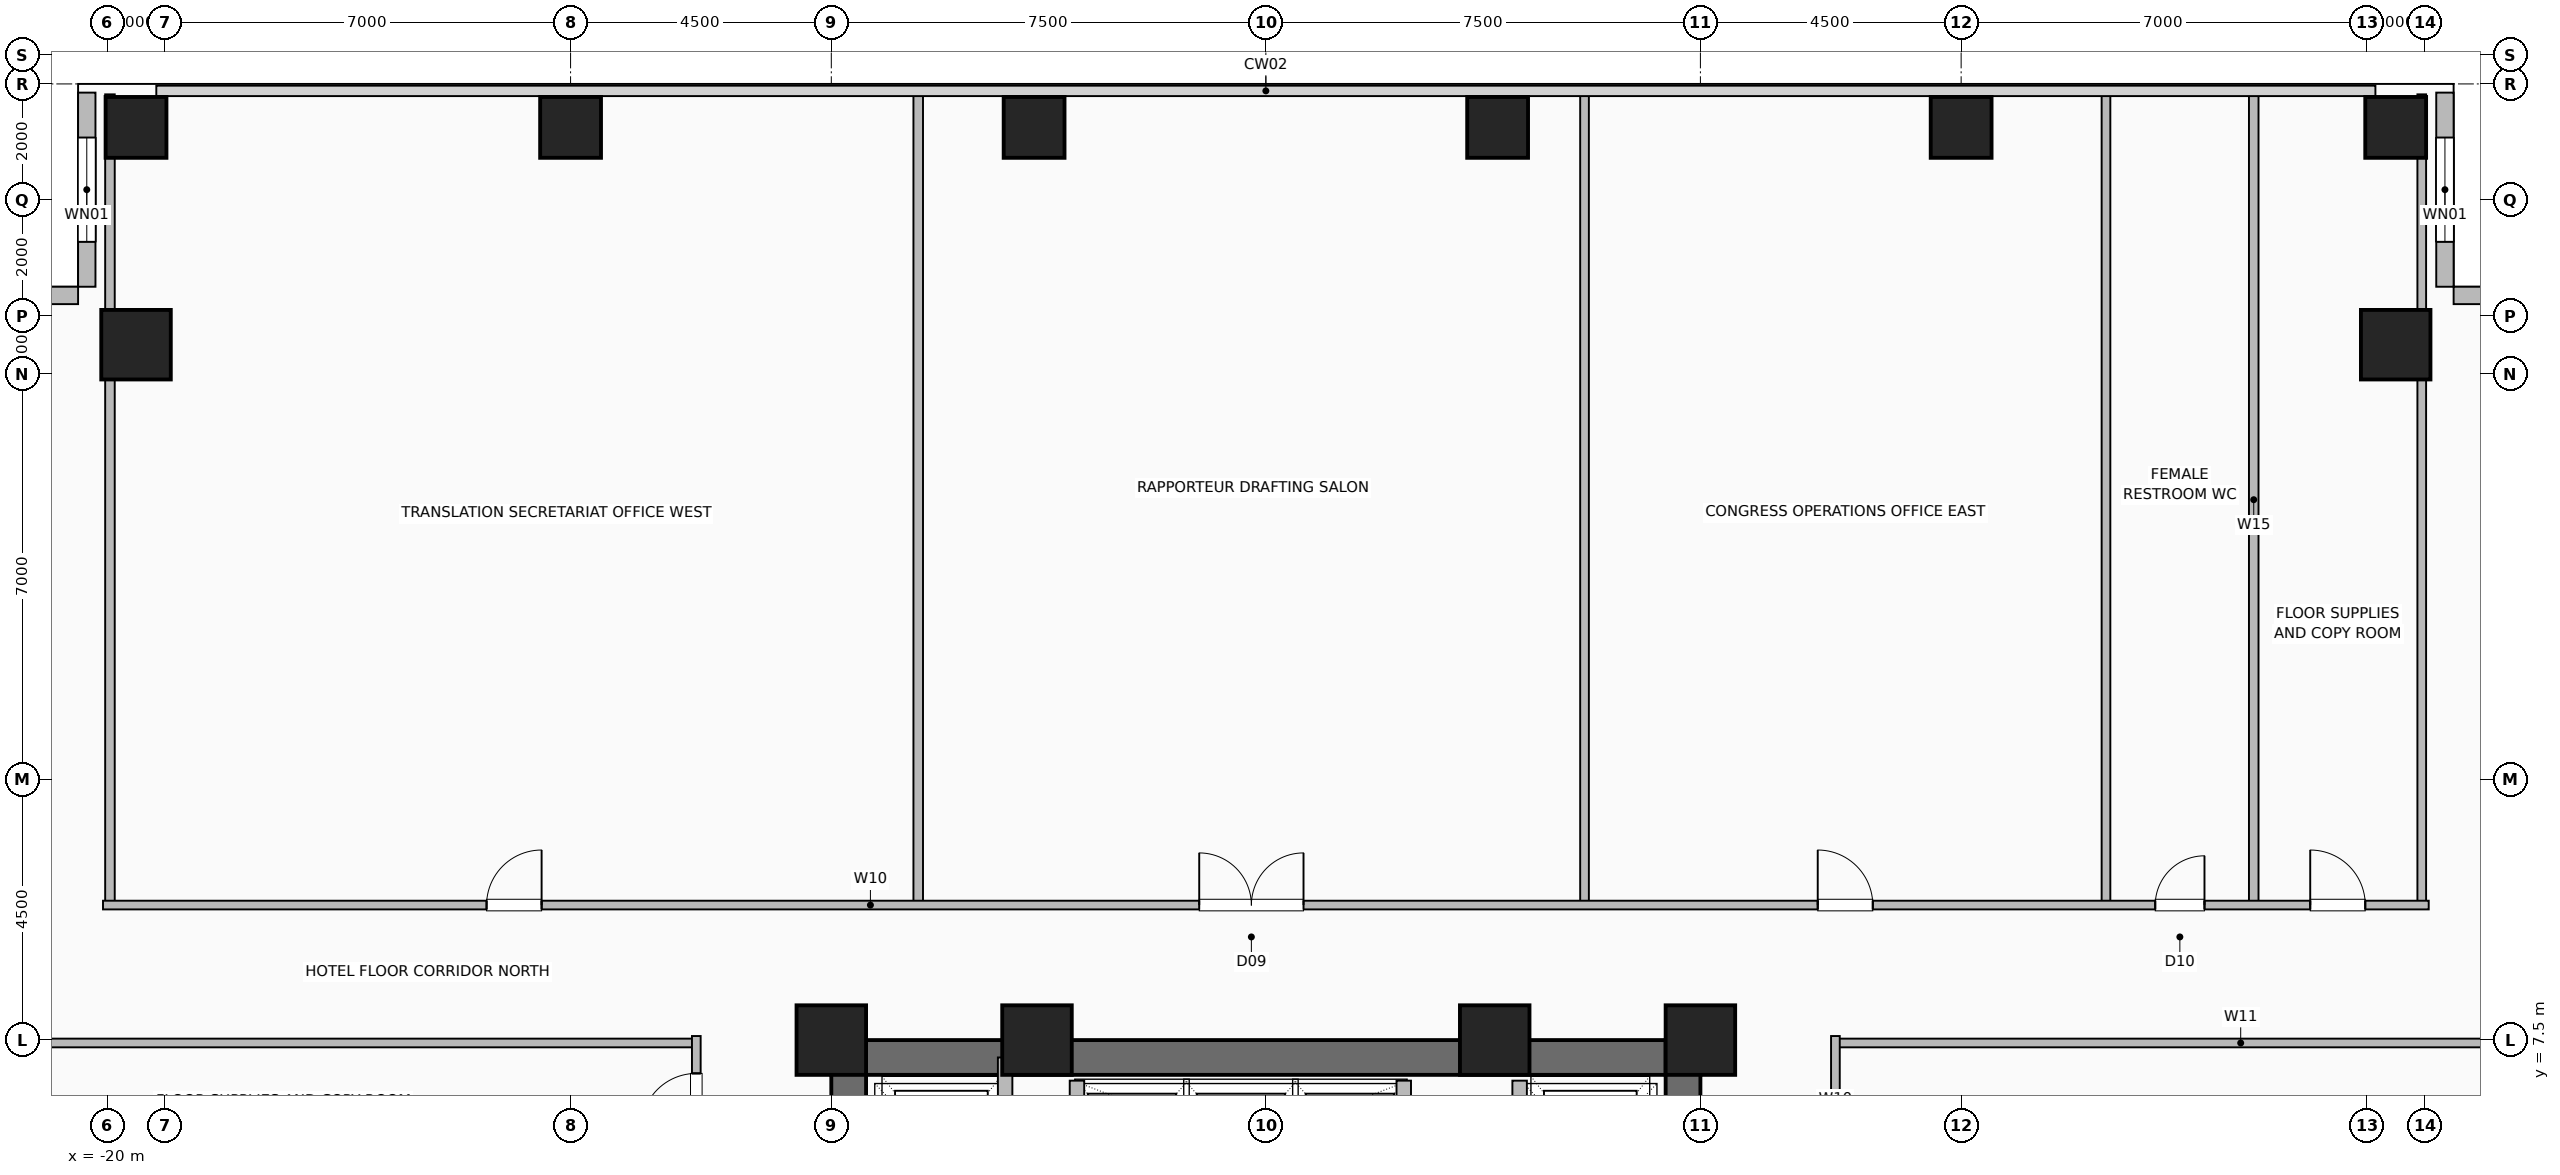
"""IFC4 building model, lengths in metres.
Left out: names, types, materials, properties, quantities, classifications, styles, units other than length and angle.
Written with IfcOpenShell. Run it as: python <this file> out.ifc"""

import sys

from ifc_helpers import new_model, si_unit, direction, frame, frame_2d, origin, origin_2d, place, context, subcontext, project, spatial, rectangle, hollow_rectangle, extrude, element, fill, save


model = new_model("IFC4")
c1 = context("Model", 3, precision=1e-05, world=origin(), true_north=direction((0.0, 1.0)))
c2 = subcontext(c1, "Body", "Model", "MODEL_VIEW")
j1 = project(units=[si_unit("LENGTHUNIT", "METRE"), si_unit("PLANEANGLEUNIT", "RADIAN")], contexts=[c1])
p1 = place(None, origin())
s1 = spatial("IfcSite", under=j1, at=p1, CompositionType="ELEMENT")
p2 = place(p1, origin())
s2 = spatial("IfcBuilding", under=s1, at=p2, CompositionType="ELEMENT")
p3 = place(p2, frame((0.0, 0.0, 41.0)))
s3 = spatial("IfcBuildingStorey", under=s2, at=p3, CompositionType="ELEMENT", Elevation=41.0)
for number, where, z_axis, x_axis in (
    (1, (7.5, 7.5, 0.0), (0.0, 0.0, 1.0), (1.0, 0.0, 0.0)),
    (2, (3.95, 7.5, 0.0), (0.0, 0.0, 1.0), (1.0, 0.0, 0.0)),
    (3, (-3.95, 7.5, 0.0), (0.0, 0.0, 1.0), (1.0, 0.0, 0.0)),
    (4, (-7.5, 7.5, 0.0), (0.0, 0.0, 1.0), (1.0, 0.0, 0.0)),
):
    element("IfcColumn", number, at=place(p3, frame(where, z_axis=z_axis, x_axis=x_axis)), inside=s3, PredefinedType="COLUMN", context=c2, shape_type="SweptSolid", body=[
        extrude(hollow_rectangle(XDim=1.2, YDim=1.2, WallThickness=0.055, at=origin_2d()), origin(), (0.0, 0.0, 1.0), 3.5),
    ])
for number, where, z_axis, x_axis in (
    (5, (-19.5, 23.25, 0.0), (0.0, 0.0, 1.0), (1.0, 0.0, 0.0)),
    (6, (-12.0, 23.25, 0.0), (0.0, 0.0, 1.0), (1.0, 0.0, 0.0)),
    (7, (-4.0, 23.25, 0.0), (0.0, 0.0, 1.0), (1.0, 0.0, 0.0)),
    (8, (4.0, 23.25, 0.0), (0.0, 0.0, 1.0), (1.0, 0.0, 0.0)),
    (9, (12.0, 23.25, 0.0), (0.0, 0.0, 1.0), (1.0, 0.0, 0.0)),
    (10, (19.5, 23.25, 0.0), (0.0, 0.0, 1.0), (1.0, 0.0, 0.0)),
):
    element("IfcColumn", number, at=place(p3, frame(where, z_axis=z_axis, x_axis=x_axis)), inside=s3, PredefinedType="COLUMN", context=c2, shape_type="SweptSolid", body=[
        extrude(hollow_rectangle(XDim=1.05, YDim=1.05, WallThickness=0.05, at=origin_2d()), origin(), (0.0, 0.0, 1.0), 3.5),
    ])
for number, where, z_axis, x_axis in (
    (11, (19.5, 19.5, 0.0), (0.0, 0.0, 1.0), (1.0, 0.0, 0.0)),
    (12, (-19.5, 19.5, 0.0), (0.0, 0.0, 1.0), (1.0, 0.0, 0.0)),
):
    element("IfcColumn", number, at=place(p3, frame(where, z_axis=z_axis, x_axis=x_axis)), inside=s3, PredefinedType="COLUMN", context=c2, shape_type="SweptSolid", body=[
        extrude(hollow_rectangle(XDim=1.2, YDim=1.2, WallThickness=0.055, at=origin_2d()), origin(), (0.0, 0.0, 1.0), 3.5),
    ])
p4 = place(p3, frame((20.35, 23.85, 0.0), z_axis=(0.0, 0.0, 1.0), x_axis=(0.0, -1.0, 0.0)))
e13 = element("IfcWall", 13, at=p4, inside=s3, PredefinedType="SOLIDWALL", context=c2, shape_type="SweptSolid", body=[
    extrude(rectangle(XDim=3.35, YDim=0.3, at=frame_2d((1.675, 0.0))), origin(), (0.0, 0.0, 1.0), 3.25),
])
p5 = place(p4, frame((0.775, 0.0, 0.9)))
e14 = element("IfcOpeningElement", 14, at=p5, cuts=e13, PredefinedType="OPENING", context=c2, shape_type="SweptSolid", body=[
    extrude(rectangle(XDim=1.8, YDim=1.8, at=frame_2d((0.9, 0.9))), frame((0.0, 0.16, 0.0), z_axis=(0.0, -1.0, 0.0), x_axis=(1.0, 0.0, 0.0)), (0.0, 0.0, 1.0), 0.32),
])
p6 = place(p3, frame((23.85, 20.35, 0.0), z_axis=(0.0, 0.0, 1.0), x_axis=(-1.0, 0.0, 0.0)))
e15 = element("IfcWall", 15, at=p6, inside=s3, PredefinedType="SOLIDWALL", context=c2, shape_type="SweptSolid", body=[
    extrude(rectangle(XDim=3.35, YDim=0.3, at=frame_2d((1.675, 0.0))), origin(), (0.0, 0.0, 1.0), 3.25),
])
p7 = place(p3, frame((-20.35, 23.85, 0.0), z_axis=(0.0, 0.0, 1.0), x_axis=(0.0, -1.0, 0.0)))
e16 = element("IfcWall", 16, at=p7, inside=s3, PredefinedType="SOLIDWALL", context=c2, shape_type="SweptSolid", body=[
    extrude(rectangle(XDim=3.35, YDim=0.3, at=frame_2d((1.675, 0.0))), origin(), (0.0, 0.0, 1.0), 3.25),
])
p8 = place(p7, frame((0.775, 0.0, 0.9)))
e17 = element("IfcOpeningElement", 17, at=p8, cuts=e16, PredefinedType="OPENING", context=c2, shape_type="SweptSolid", body=[
    extrude(rectangle(XDim=1.8, YDim=1.8, at=frame_2d((0.9, 0.9))), frame((0.0, 0.16, 0.0), z_axis=(0.0, -1.0, 0.0), x_axis=(1.0, 0.0, 0.0)), (0.0, 0.0, 1.0), 0.32),
])
p9 = place(p3, frame((-23.85, 20.35, 0.0), z_axis=(0.0, 0.0, 1.0), x_axis=(1.0, 0.0, 0.0)))
e18 = element("IfcWall", 18, at=p9, inside=s3, PredefinedType="SOLIDWALL", context=c2, shape_type="SweptSolid", body=[
    extrude(rectangle(XDim=3.35, YDim=0.3, at=frame_2d((1.675, 0.0))), origin(), (0.0, 0.0, 1.0), 3.25),
])
p10 = place(p3, frame((-7.5, 7.2, 0.0), z_axis=(0.0, 0.0, 1.0), x_axis=(1.0, 0.0, 0.0)))
e19 = element("IfcWall", 19, at=p10, inside=s3, PredefinedType="SHEAR", context=c2, shape_type="SweptSolid", body=[
    extrude(rectangle(XDim=15.0, YDim=0.6, at=frame_2d((7.5, 0.0))), origin(), (0.0, 0.0, 1.0), 3.25),
])
p11 = place(p3, frame((-7.2, -7.5, 0.0), z_axis=(0.0, 0.0, 1.0), x_axis=(0.0, 1.0, 0.0)))
e20 = element("IfcWall", 20, at=p11, inside=s3, PredefinedType="SHEAR", context=c2, shape_type="SweptSolid", body=[
    extrude(rectangle(XDim=15.0, YDim=0.6, at=frame_2d((7.5, 0.0))), origin(), (0.0, 0.0, 1.0), 3.25),
])
p12 = place(p11, frame((9.5, 0.0, 0.0)))
e21 = element("IfcOpeningElement", 21, at=p12, cuts=e20, PredefinedType="OPENING", context=c2, shape_type="SweptSolid", body=[
    extrude(rectangle(XDim=1.0, YDim=2.08, at=frame_2d((0.5, 1.04))), frame((0.0, 0.31, 0.0), z_axis=(0.0, -1.0, 0.0), x_axis=(1.0, 0.0, 0.0)), (0.0, 0.0, 1.0), 0.62),
])
p13 = place(p3, frame((7.2, -7.5, 0.0), z_axis=(0.0, 0.0, 1.0), x_axis=(0.0, 1.0, 0.0)))
e22 = element("IfcWall", 22, at=p13, inside=s3, PredefinedType="SHEAR", context=c2, shape_type="SweptSolid", body=[
    extrude(rectangle(XDim=15.0, YDim=0.6, at=frame_2d((7.5, 0.0))), origin(), (0.0, 0.0, 1.0), 3.25),
])
for number, where, z_axis, x_axis in (
    (23, (-3.26, 4.58, 0.0), (0.0, 0.0, 1.0), (0.0, 1.0, 0.0)),
    (24, (2.38, 4.58, 0.0), (0.0, 0.0, 1.0), (0.0, 1.0, 0.0)),
):
    element("IfcWall", number, at=place(p3, frame(where, z_axis=z_axis, x_axis=x_axis)), inside=s3, PredefinedType="SHEAR", context=c2, shape_type="SweptSolid", body=[
        extrude(rectangle(XDim=2.22, YDim=0.25, at=frame_2d((1.11, 0.0))), origin(), (0.0, 0.0, 1.0), 3.25),
    ])
p14 = place(p3, frame((-4.5, 4.35, 0.0), z_axis=(0.0, 0.0, 1.0), x_axis=(0.0, 1.0, 0.0)))
e25 = element("IfcWall", 25, at=p14, inside=s3, PredefinedType="SHEAR", context=c2, shape_type="SweptSolid", body=[
    extrude(rectangle(XDim=2.85, YDim=0.25, at=frame_2d((1.425, 0.0))), origin(), (0.0, 0.0, 1.0), 3.25),
])
p15 = place(p3, frame((4.38, 4.3, 0.0), z_axis=(0.0, 0.0, 1.0), x_axis=(0.0, 1.0, 0.0)))
e26 = element("IfcWall", 26, at=p15, inside=s3, PredefinedType="SHEAR", context=c2, shape_type="SweptSolid", body=[
    extrude(rectangle(XDim=2.5, YDim=0.25, at=frame_2d((1.25, 0.0))), origin(), (0.0, 0.0, 1.0), 3.25),
])
p16 = place(p15, frame((0.8, 0.0, 0.0)))
e27 = element("IfcOpeningElement", 27, at=p16, cuts=e26, PredefinedType="OPENING", context=c2, shape_type="SweptSolid", body=[
    extrude(rectangle(XDim=1.2, YDim=2.2, at=frame_2d((0.6, 1.1))), frame((0.0, 0.135, 0.0), z_axis=(0.0, -1.0, 0.0), x_axis=(1.0, 0.0, 0.0)), (0.0, 0.0, 1.0), 0.27),
])
for number, where, z_axis, x_axis in (
    (28, (17.05, 9.83, 0.0), (0.0, 0.0, 1.0), (0.0, 1.0, 0.0)),
    (29, (-19.95, 9.83, 0.0), (0.0, 0.0, 1.0), (0.0, 1.0, 0.0)),
    (30, (-6.0, 9.83, 0.0), (0.0, 0.0, 1.0), (0.0, 1.0, 0.0)),
):
    element("IfcWall", number, at=place(p3, frame(where, z_axis=z_axis, x_axis=x_axis)), inside=s3, PredefinedType="PLUMBINGWALL", context=c2, shape_type="SweptSolid", body=[
        extrude(rectangle(XDim=13.99, YDim=0.165, at=frame_2d((6.995, 0.0))), origin(), (0.0, 0.0, 1.0), 3.25),
    ])
for number, where, z_axis, x_axis in (
    (31, (5.5, 9.83, 0.0), (0.0, 0.0, 1.0), (0.0, 1.0, 0.0)),
    (32, (14.5, 9.83, 0.0), (0.0, 0.0, 1.0), (0.0, 1.0, 0.0)),
    (33, (19.95, 9.83, 0.0), (0.0, 0.0, 1.0), (0.0, 1.0, 0.0)),
):
    element("IfcWall", number, at=place(p3, frame(where, z_axis=z_axis, x_axis=x_axis)), inside=s3, PredefinedType="PARTITIONING", context=c2, shape_type="SweptSolid", body=[
        extrude(rectangle(XDim=13.99, YDim=0.15, at=frame_2d((6.995, 0.0))), origin(), (0.0, 0.0, 1.0), 3.25),
    ])
p17 = place(p3, frame((-20.07, 9.83, 0.0), z_axis=(0.0, 0.0, 1.0), x_axis=(1.0, 0.0, 0.0)))
e34 = element("IfcWall", 34, at=p17, inside=s3, PredefinedType="PARTITIONING", context=c2, shape_type="SweptSolid", body=[
    extrude(rectangle(XDim=40.14, YDim=0.15, at=frame_2d((20.07, 0.0))), origin(), (0.0, 0.0, 1.0), 3.25),
])
p18 = place(p17, frame((6.62, 0.0, 0.0)))
e35 = element("IfcOpeningElement", 35, at=p18, cuts=e34, PredefinedType="OPENING", context=c2, shape_type="SweptSolid", body=[
    extrude(rectangle(XDim=0.95, YDim=2.06, at=frame_2d((0.475, 1.03))), frame((0.0, 0.085, 0.0), z_axis=(0.0, -1.0, 0.0), x_axis=(1.0, 0.0, 0.0)), (0.0, 0.0, 1.0), 0.17),
])
p19 = place(p17, frame((18.92, 0.0, 0.0)))
e36 = element("IfcOpeningElement", 36, at=p19, cuts=e34, PredefinedType="OPENING", context=c2, shape_type="SweptSolid", body=[
    extrude(rectangle(XDim=1.8, YDim=2.08, at=frame_2d((0.9, 1.04))), frame((0.0, 0.085, 0.0), z_axis=(0.0, -1.0, 0.0), x_axis=(1.0, 0.0, 0.0)), (0.0, 0.0, 1.0), 0.17),
])
p20 = place(p17, frame((29.595, 0.0, 0.0)))
e37 = element("IfcOpeningElement", 37, at=p20, cuts=e34, PredefinedType="OPENING", context=c2, shape_type="SweptSolid", body=[
    extrude(rectangle(XDim=0.95, YDim=2.06, at=frame_2d((0.475, 1.03))), frame((0.0, 0.085, 0.0), z_axis=(0.0, -1.0, 0.0), x_axis=(1.0, 0.0, 0.0)), (0.0, 0.0, 1.0), 0.17),
])
p21 = place(p17, frame((35.42, 0.0, 0.0)))
e38 = element("IfcOpeningElement", 38, at=p21, cuts=e34, PredefinedType="OPENING", context=c2, shape_type="SweptSolid", body=[
    extrude(rectangle(XDim=0.85, YDim=2.05, at=frame_2d((0.425, 1.025))), frame((0.0, 0.085, 0.0), z_axis=(0.0, -1.0, 0.0), x_axis=(1.0, 0.0, 0.0)), (0.0, 0.0, 1.0), 0.17),
])
p22 = place(p17, frame((38.095, 0.0, 0.0)))
e39 = element("IfcOpeningElement", 39, at=p22, cuts=e34, PredefinedType="OPENING", context=c2, shape_type="SweptSolid", body=[
    extrude(rectangle(XDim=0.95, YDim=2.06, at=frame_2d((0.475, 1.03))), frame((0.0, 0.085, 0.0), z_axis=(0.0, -1.0, 0.0), x_axis=(1.0, 0.0, 0.0)), (0.0, 0.0, 1.0), 0.17),
])
p23 = place(p3, frame((-23.82, 7.45, 0.0), z_axis=(0.0, 0.0, 1.0), x_axis=(1.0, 0.0, 0.0)))
e40 = element("IfcWall", 40, at=p23, inside=s3, PredefinedType="PARTITIONING", context=c2, shape_type="SweptSolid", body=[
    extrude(rectangle(XDim=13.99, YDim=0.15, at=frame_2d((6.995, 0.0))), origin(), (0.0, 0.0, 1.0), 3.25),
])
p24 = place(p3, frame((-9.83, -7.57, 0.0), z_axis=(0.0, 0.0, 1.0), x_axis=(0.0, 1.0, 0.0)))
e41 = element("IfcWall", 41, at=p24, inside=s3, PredefinedType="PARTITIONING", context=c2, shape_type="SweptSolid", body=[
    extrude(rectangle(XDim=15.14, YDim=0.15, at=frame_2d((7.57, 0.0))), origin(), (0.0, 0.0, 1.0), 3.25),
])
p25 = place(p24, frame((4.845, 0.0, 0.0)))
e42 = element("IfcOpeningElement", 42, at=p25, cuts=e41, PredefinedType="OPENING", context=c2, shape_type="SweptSolid", body=[
    extrude(rectangle(XDim=1.8, YDim=2.08, at=frame_2d((0.9, 1.04))), frame((0.0, 0.085, 0.0), z_axis=(0.0, -1.0, 0.0), x_axis=(1.0, 0.0, 0.0)), (0.0, 0.0, 1.0), 0.17),
])
p26 = place(p24, frame((11.77, 0.0, 0.0)))
e43 = element("IfcOpeningElement", 43, at=p26, cuts=e41, PredefinedType="OPENING", context=c2, shape_type="SweptSolid", body=[
    extrude(rectangle(XDim=0.85, YDim=2.05, at=frame_2d((0.425, 1.025))), frame((0.0, 0.085, 0.0), z_axis=(0.0, -1.0, 0.0), x_axis=(1.0, 0.0, 0.0)), (0.0, 0.0, 1.0), 0.17),
])
p27 = place(p24, frame((13.545, 0.0, 0.0)))
e44 = element("IfcOpeningElement", 44, at=p27, cuts=e41, PredefinedType="OPENING", context=c2, shape_type="SweptSolid", body=[
    extrude(rectangle(XDim=0.95, YDim=2.06, at=frame_2d((0.475, 1.03))), frame((0.0, 0.085, 0.0), z_axis=(0.0, -1.0, 0.0), x_axis=(1.0, 0.0, 0.0)), (0.0, 0.0, 1.0), 0.17),
])
p28 = place(p3, frame((9.83, 7.45, 0.0), z_axis=(0.0, 0.0, 1.0), x_axis=(1.0, 0.0, 0.0)))
e45 = element("IfcWall", 45, at=p28, inside=s3, PredefinedType="PARTITIONING", context=c2, shape_type="SweptSolid", body=[
    extrude(rectangle(XDim=13.99, YDim=0.15, at=frame_2d((6.995, 0.0))), origin(), (0.0, 0.0, 1.0), 3.25),
])
p29 = place(p3, frame((9.83, -7.57, 0.0), z_axis=(0.0, 0.0, 1.0), x_axis=(0.0, 1.0, 0.0)))
e46 = element("IfcWall", 46, at=p29, inside=s3, PredefinedType="PARTITIONING", context=c2, shape_type="SweptSolid", body=[
    extrude(rectangle(XDim=15.14, YDim=0.15, at=frame_2d((7.57, 0.0))), origin(), (0.0, 0.0, 1.0), 3.25),
])
p30 = place(p29, frame((2.12, 0.0, 0.0)))
e47 = element("IfcOpeningElement", 47, at=p30, cuts=e46, PredefinedType="OPENING", context=c2, shape_type="SweptSolid", body=[
    extrude(rectangle(XDim=0.95, YDim=2.06, at=frame_2d((0.475, 1.03))), frame((0.0, 0.085, 0.0), z_axis=(0.0, -1.0, 0.0), x_axis=(1.0, 0.0, 0.0)), (0.0, 0.0, 1.0), 0.17),
])
p31 = place(p29, frame((7.095, 0.0, 0.0)))
e48 = element("IfcOpeningElement", 48, at=p31, cuts=e46, PredefinedType="OPENING", context=c2, shape_type="SweptSolid", body=[
    extrude(rectangle(XDim=0.95, YDim=2.06, at=frame_2d((0.475, 1.03))), frame((0.0, 0.085, 0.0), z_axis=(0.0, -1.0, 0.0), x_axis=(1.0, 0.0, 0.0)), (0.0, 0.0, 1.0), 0.17),
])
p32 = place(p29, frame((12.07, 0.0, 0.0)))
e49 = element("IfcOpeningElement", 49, at=p32, cuts=e46, PredefinedType="OPENING", context=c2, shape_type="SweptSolid", body=[
    extrude(rectangle(XDim=0.95, YDim=2.06, at=frame_2d((0.475, 1.03))), frame((0.0, 0.085, 0.0), z_axis=(0.0, -1.0, 0.0), x_axis=(1.0, 0.0, 0.0)), (0.0, 0.0, 1.0), 0.17),
])
p33 = place(p5, origin())
e50 = element("IfcWindow", 50, at=p33, inside=s3, PartitioningType="SINGLE_PANEL", PredefinedType="WINDOW", context=c2, shape_type="SweptSolid", body=[
    extrude(rectangle(XDim=1.8, YDim=1.8, at=frame_2d((0.9, 0.9))), frame((0.0, 0.03, 0.0), z_axis=(0.0, -1.0, 0.0), x_axis=(1.0, 0.0, 0.0)), (0.0, 0.0, 1.0), 0.06),
])
fill(e14, e50)
p34 = place(p8, origin())
e51 = element("IfcWindow", 51, at=p34, inside=s3, PartitioningType="SINGLE_PANEL", PredefinedType="WINDOW", context=c2, shape_type="SweptSolid", body=[
    extrude(rectangle(XDim=1.8, YDim=1.8, at=frame_2d((0.9, 0.9))), frame((0.0, 0.03, 0.0), z_axis=(0.0, -1.0, 0.0), x_axis=(1.0, 0.0, 0.0)), (0.0, 0.0, 1.0), 0.06),
])
fill(e17, e51)
p35 = place(p18, origin())
e52 = element("IfcDoor", 52, at=p35, inside=s3, OperationType="SINGLE_SWING_RIGHT", PredefinedType="DOOR", context=c2, shape_type="SweptSolid", body=[
    extrude(rectangle(XDim=0.95, YDim=2.06, at=frame_2d((0.475, 1.03))), frame((0.0, 0.025, 0.0), z_axis=(0.0, -1.0, 0.0), x_axis=(1.0, 0.0, 0.0)), (0.0, 0.0, 1.0), 0.05),
])
fill(e35, e52)
p36 = place(p19, origin())
e53 = element("IfcDoor", 53, at=p36, inside=s3, OperationType="DOUBLE_DOOR_SINGLE_SWING", PredefinedType="DOOR", context=c2, shape_type="SweptSolid", body=[
    extrude(rectangle(XDim=1.8, YDim=2.08, at=frame_2d((0.9, 1.04))), frame((0.0, 0.025, 0.0), z_axis=(0.0, -1.0, 0.0), x_axis=(1.0, 0.0, 0.0)), (0.0, 0.0, 1.0), 0.05),
])
fill(e36, e53)
p37 = place(p20, origin())
e54 = element("IfcDoor", 54, at=p37, inside=s3, OperationType="SINGLE_SWING_LEFT", PredefinedType="DOOR", context=c2, shape_type="SweptSolid", body=[
    extrude(rectangle(XDim=0.95, YDim=2.06, at=frame_2d((0.475, 1.03))), frame((0.0, 0.025, 0.0), z_axis=(0.0, -1.0, 0.0), x_axis=(1.0, 0.0, 0.0)), (0.0, 0.0, 1.0), 0.05),
])
fill(e37, e54)
p38 = place(p21, origin())
e55 = element("IfcDoor", 55, at=p38, inside=s3, OperationType="SINGLE_SWING_RIGHT", PredefinedType="DOOR", context=c2, shape_type="SweptSolid", body=[
    extrude(rectangle(XDim=0.85, YDim=2.05, at=frame_2d((0.425, 1.025))), frame((0.0, 0.025, 0.0), z_axis=(0.0, -1.0, 0.0), x_axis=(1.0, 0.0, 0.0)), (0.0, 0.0, 1.0), 0.05),
])
fill(e38, e55)
p39 = place(p22, origin())
e56 = element("IfcDoor", 56, at=p39, inside=s3, OperationType="SINGLE_SWING_LEFT", PredefinedType="DOOR", context=c2, shape_type="SweptSolid", body=[
    extrude(rectangle(XDim=0.95, YDim=2.06, at=frame_2d((0.475, 1.03))), frame((0.0, 0.025, 0.0), z_axis=(0.0, -1.0, 0.0), x_axis=(1.0, 0.0, 0.0)), (0.0, 0.0, 1.0), 0.05),
])
fill(e39, e56)
p40 = place(p27, origin())
e57 = element("IfcDoor", 57, at=p40, inside=s3, OperationType="SINGLE_SWING_LEFT", PredefinedType="DOOR", context=c2, shape_type="SweptSolid", body=[
    extrude(rectangle(XDim=0.95, YDim=2.06, at=frame_2d((0.475, 1.03))), frame((0.0, 0.025, 0.0), z_axis=(0.0, -1.0, 0.0), x_axis=(1.0, 0.0, 0.0)), (0.0, 0.0, 1.0), 0.05),
])
fill(e44, e57)
save(model, sys.argv[1])
